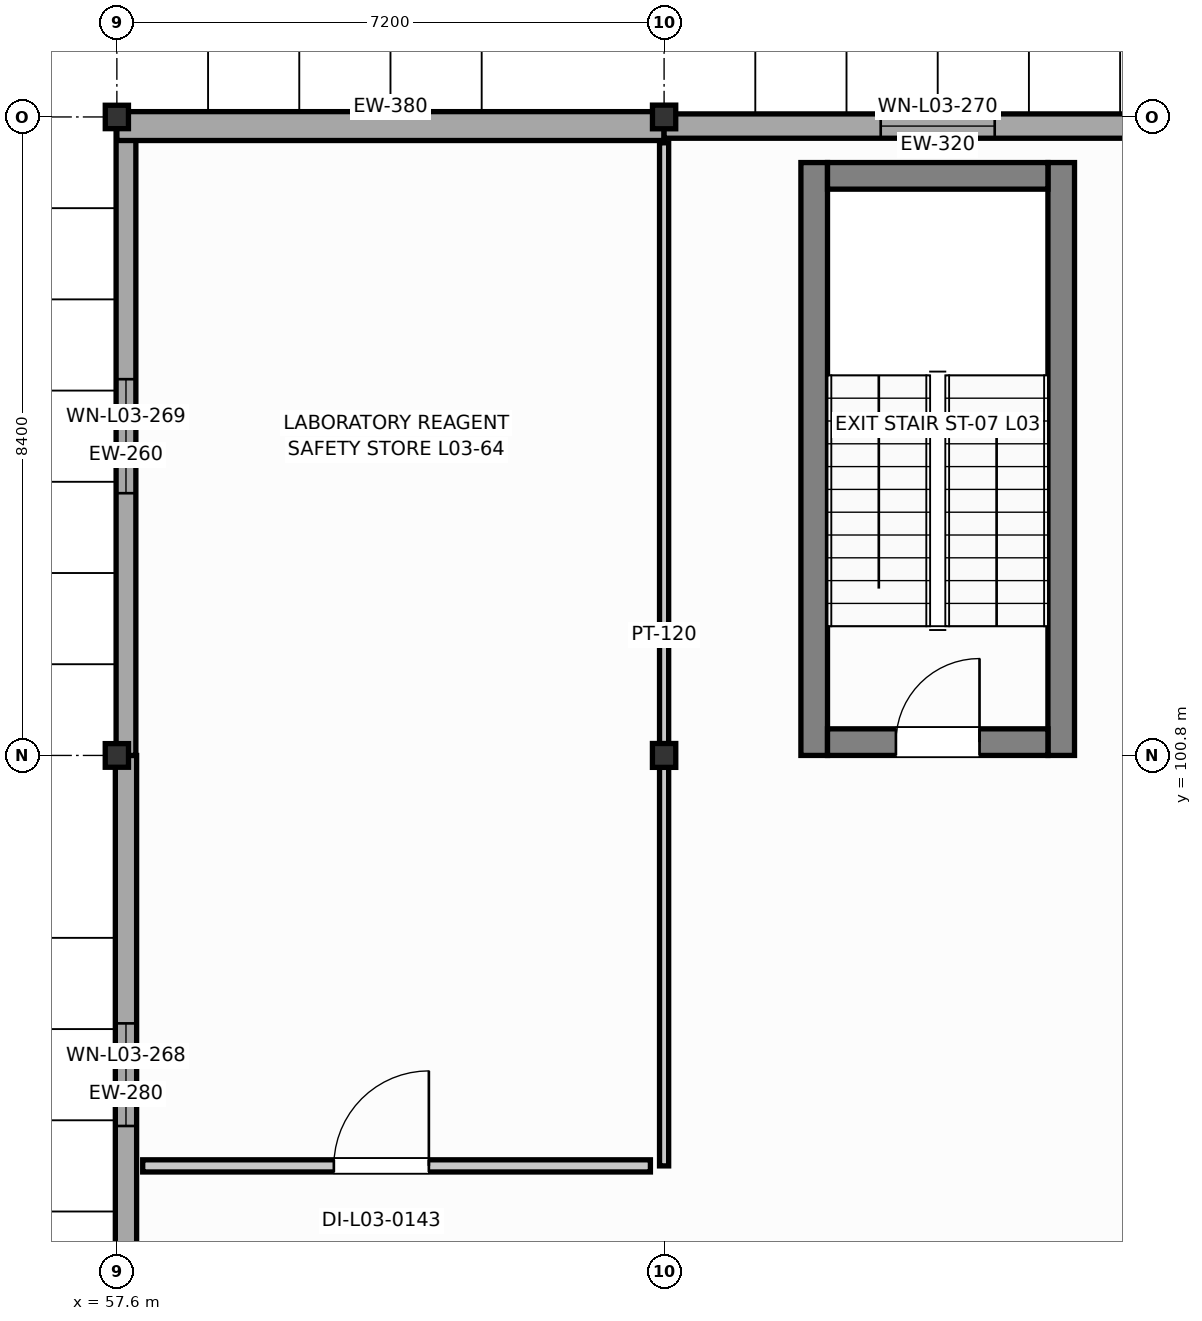
"""IFC4 building model, lengths in metres.
Left out: names, types, materials, properties, quantities, classifications, styles, units other than length and angle.
Written with IfcOpenShell. Run it as: python <this file> out.ifc"""

import sys

from ifc_helpers import new_model, si_unit, direction, frame, frame_2d, origin, origin_2d, place, context, subcontext, project, spatial, rectangle, i_section, extrude, element, fill, save


model = new_model("IFC4")
c1 = context("Model", 3, precision=1e-05, world=origin(), true_north=direction((0.0, 1.0)))
c2 = subcontext(c1, "Body", "Model", "MODEL_VIEW")
j1 = project(units=[si_unit("LENGTHUNIT", "METRE"), si_unit("PLANEANGLEUNIT", "RADIAN")], contexts=[c1])
p1 = place(None, origin())
s1 = spatial("IfcSite", under=j1, at=p1, CompositionType="ELEMENT")
p2 = place(p1, origin())
s2 = spatial("IfcBuilding", under=s1, at=p2, CompositionType="ELEMENT")
p3 = place(p2, frame((0.0, 0.0, 13.2)))
s3 = spatial("IfcBuildingStorey", under=s2, at=p3, CompositionType="ELEMENT", Elevation=13.2)
p4 = place(p3, frame((57.6, 100.8, 0.0), z_axis=(0.0, 0.0, 1.0), x_axis=(1.0, 0.0, 0.0)))
e1 = element("IfcColumn", 1, at=p4, inside=s3, PredefinedType="COLUMN", context=c2, shape_type="SweptSolid", body=[
    extrude(i_section(OverallWidth=0.306, OverallDepth=0.311, WebThickness=0.011, FlangeThickness=0.017, FilletRadius=0.015, at=origin_2d()), origin(), (0.0, 0.0, 1.0), 4.2),
])
p5 = place(p3, frame((57.6, 109.2, 0.0), z_axis=(0.0, 0.0, 1.0), x_axis=(1.0, 0.0, 0.0)))
e2 = element("IfcColumn", 2, at=p5, inside=s3, PredefinedType="COLUMN", context=c2, shape_type="SweptSolid", body=[
    extrude(i_section(OverallWidth=0.305, OverallDepth=0.308, WebThickness=0.01, FlangeThickness=0.015, FilletRadius=0.015, at=origin_2d()), origin(), (0.0, 0.0, 1.0), 4.2),
])
p6 = place(p3, frame((64.8, 100.8, 0.0), z_axis=(0.0, 0.0, 1.0), x_axis=(1.0, 0.0, 0.0)))
e3 = element("IfcColumn", 3, at=p6, inside=s3, PredefinedType="COLUMN", context=c2, shape_type="SweptSolid", body=[
    extrude(i_section(OverallWidth=0.307, OverallDepth=0.314, WebThickness=0.012, FlangeThickness=0.019, FilletRadius=0.016, at=origin_2d()), origin(), (0.0, 0.0, 1.0), 4.2),
])
p7 = place(p3, frame((64.8, 109.2, 0.0), z_axis=(0.0, 0.0, 1.0), x_axis=(1.0, 0.0, 0.0)))
e4 = element("IfcColumn", 4, at=p7, inside=s3, PredefinedType="COLUMN", context=c2, shape_type="SweptSolid", body=[
    extrude(i_section(OverallWidth=0.306, OverallDepth=0.311, WebThickness=0.011, FlangeThickness=0.017, FilletRadius=0.015, at=origin_2d()), origin(), (0.0, 0.0, 1.0), 4.2),
])
for number, where, z_axis, x_axis in (
    (5, (66.775, 100.8, 0.0), (0.0, 0.0, 1.0), (0.0, 1.0, 0.0)),
    (6, (70.025, 100.8, 0.0), (0.0, 0.0, 1.0), (0.0, 1.0, 0.0)),
):
    element("IfcWall", number, at=place(p3, frame(where, z_axis=z_axis, x_axis=x_axis)), inside=s3, PredefinedType="SHEAR", context=c2, shape_type="SweptSolid", body=[
        extrude(rectangle(XDim=7.8, YDim=0.35, at=frame_2d((3.9, 0.0))), origin(), (0.0, 0.0, 1.0), 3.97),
    ])
p8 = place(p3, frame((66.95, 108.425, 0.0), z_axis=(0.0, 0.0, 1.0), x_axis=(1.0, 0.0, 0.0)))
e7 = element("IfcWall", 7, at=p8, inside=s3, PredefinedType="SHEAR", context=c2, shape_type="SweptSolid", body=[
    extrude(rectangle(XDim=2.9, YDim=0.35, at=frame_2d((1.45, 0.0))), origin(), (0.0, 0.0, 1.0), 3.97),
])
p9 = place(p3, frame((66.95, 100.975, 0.0), z_axis=(0.0, 0.0, 1.0), x_axis=(1.0, 0.0, 0.0)))
e8 = element("IfcWall", 8, at=p9, inside=s3, PredefinedType="SHEAR", context=c2, shape_type="SweptSolid", body=[
    extrude(rectangle(XDim=2.9, YDim=0.35, at=frame_2d((1.45, 0.0))), origin(), (0.0, 0.0, 1.0), 3.97),
])
p10 = place(p9, frame((0.9, 0.0, 0.0)))
e9 = element("IfcOpeningElement", 9, at=p10, cuts=e8, PredefinedType="OPENING", context=c2, shape_type="SweptSolid", body=[
    extrude(rectangle(XDim=1.1, YDim=2.15, at=frame_2d((0.55, 1.075))), frame((0.0, 0.185, 0.0), z_axis=(0.0, -1.0, 0.0), x_axis=(1.0, 0.0, 0.0)), (0.0, 0.0, 1.0), 0.37),
])
p11 = place(p3, frame((57.72, 92.4, 0.0), z_axis=(0.0, 0.0, 1.0), x_axis=(0.0, 1.0, 0.0)))
e10 = element("IfcWall", 10, at=p11, inside=s3, PredefinedType="SOLIDWALL", context=c2, shape_type="SweptSolid", body=[
    extrude(rectangle(XDim=8.4, YDim=0.28, at=frame_2d((4.2, 0.0))), origin(), (0.0, 0.0, 1.0), 3.172),
])
p12 = place(p11, frame((3.525, 0.0, 0.95)))
e11 = element("IfcOpeningElement", 11, at=p12, cuts=e10, PredefinedType="OPENING", context=c2, shape_type="SweptSolid", body=[
    extrude(rectangle(XDim=1.35, YDim=1.75, at=frame_2d((0.675, 0.875))), frame((0.0, 0.15, 0.0), z_axis=(0.0, -1.0, 0.0), x_axis=(1.0, 0.0, 0.0)), (0.0, 0.0, 1.0), 0.3),
])
p13 = place(p3, frame((57.72, 100.8, 0.0), z_axis=(0.0, 0.0, 1.0), x_axis=(0.0, 1.0, 0.0)))
e12 = element("IfcWall", 12, at=p13, inside=s3, PredefinedType="SOLIDWALL", context=c2, shape_type="SweptSolid", body=[
    extrude(rectangle(XDim=8.4, YDim=0.26, at=frame_2d((4.2, 0.0))), origin(), (0.0, 0.0, 1.0), 3.172),
])
p14 = place(p13, frame((3.45, 0.0, 0.95)))
e13 = element("IfcOpeningElement", 13, at=p14, cuts=e12, PredefinedType="OPENING", context=c2, shape_type="SweptSolid", body=[
    extrude(rectangle(XDim=1.5, YDim=1.15, at=frame_2d((0.75, 0.575))), frame((0.0, 0.14, 0.0), z_axis=(0.0, -1.0, 0.0), x_axis=(1.0, 0.0, 0.0)), (0.0, 0.0, 1.0), 0.28),
])
p15 = place(p3, frame((57.6, 109.08, 0.0), z_axis=(0.0, 0.0, 1.0), x_axis=(1.0, 0.0, 0.0)))
e14 = element("IfcWall", 14, at=p15, inside=s3, PredefinedType="SOLIDWALL", context=c2, shape_type="SweptSolid", body=[
    extrude(rectangle(XDim=7.2, YDim=0.38, at=frame_2d((3.6, 0.0))), origin(), (0.0, 0.0, 1.0), 3.482),
])
p16 = place(p3, frame((64.8, 109.08, 0.0), z_axis=(0.0, 0.0, 1.0), x_axis=(1.0, 0.0, 0.0)))
e15 = element("IfcWall", 15, at=p16, inside=s3, PredefinedType="SOLIDWALL", context=c2, shape_type="SweptSolid", body=[
    extrude(rectangle(XDim=7.2, YDim=0.32, at=frame_2d((3.6, 0.0))), origin(), (0.0, 0.0, 1.0), 3.482),
])
p17 = place(p16, frame((2.85, 0.0, 0.95)))
e16 = element("IfcOpeningElement", 16, at=p17, cuts=e15, PredefinedType="OPENING", context=c2, shape_type="SweptSolid", body=[
    extrude(rectangle(XDim=1.5, YDim=1.35, at=frame_2d((0.75, 0.675))), frame((0.0, 0.17, 0.0), z_axis=(0.0, -1.0, 0.0), x_axis=(1.0, 0.0, 0.0)), (0.0, 0.0, 1.0), 0.34),
])
p18 = place(p3, frame((64.8, 108.86, 0.0), z_axis=(0.0, 0.0, 1.0), x_axis=(0.0, -1.0, 0.0)))
e17 = element("IfcWall", 17, at=p18, inside=s3, PredefinedType="PARTITIONING", context=c2, shape_type="SweptSolid", body=[
    extrude(rectangle(XDim=13.46, YDim=0.12, at=frame_2d((6.73, 0.0))), origin(), (0.0, 0.0, 1.0), 3.328),
])
p19 = place(p3, frame((64.62, 95.4, 0.0), z_axis=(0.0, 0.0, 1.0), x_axis=(-1.0, 0.0, 0.0)))
e18 = element("IfcWall", 18, at=p19, inside=s3, PredefinedType="PARTITIONING", context=c2, shape_type="SweptSolid", body=[
    extrude(rectangle(XDim=6.68, YDim=0.16, at=frame_2d((3.34, 0.0))), origin(), (0.0, 0.0, 1.0), 3.328),
])
p20 = place(p19, frame((2.915, 0.0, 0.0)))
e19 = element("IfcOpeningElement", 19, at=p20, cuts=e18, PredefinedType="OPENING", context=c2, shape_type="SweptSolid", body=[
    extrude(rectangle(XDim=1.25, YDim=2.15, at=frame_2d((0.625, 1.075))), frame((0.0, 0.09, 0.0), z_axis=(0.0, -1.0, 0.0), x_axis=(1.0, 0.0, 0.0)), (0.0, 0.0, 1.0), 0.18),
])
p21 = place(p10, origin())
e20 = element("IfcDoor", 20, at=p21, inside=s3, OperationType="SINGLE_SWING_RIGHT", PredefinedType="DOOR", context=c2, shape_type="SweptSolid", body=[
    extrude(rectangle(XDim=1.1, YDim=2.15, at=frame_2d((0.55, 1.075))), frame((0.0, 0.025, 0.0), z_axis=(0.0, -1.0, 0.0), x_axis=(1.0, 0.0, 0.0)), (0.0, 0.0, 1.0), 0.05),
])
fill(e9, e20)
p22 = place(p12, origin())
e21 = element("IfcWindow", 21, at=p22, inside=s3, PartitioningType="SINGLE_PANEL", PredefinedType="WINDOW", context=c2, shape_type="SweptSolid", body=[
    extrude(rectangle(XDim=1.35, YDim=1.75, at=frame_2d((0.675, 0.875))), frame((0.0, 0.03, 0.0), z_axis=(0.0, -1.0, 0.0), x_axis=(1.0, 0.0, 0.0)), (0.0, 0.0, 1.0), 0.06),
])
fill(e11, e21)
p23 = place(p14, origin())
e22 = element("IfcWindow", 22, at=p23, inside=s3, PartitioningType="SINGLE_PANEL", PredefinedType="WINDOW", context=c2, shape_type="SweptSolid", body=[
    extrude(rectangle(XDim=1.5, YDim=1.15, at=frame_2d((0.75, 0.575))), frame((0.0, 0.03, 0.0), z_axis=(0.0, -1.0, 0.0), x_axis=(1.0, 0.0, 0.0)), (0.0, 0.0, 1.0), 0.06),
])
fill(e13, e22)
p24 = place(p17, origin())
e23 = element("IfcWindow", 23, at=p24, inside=s3, PartitioningType="SINGLE_PANEL", PredefinedType="WINDOW", context=c2, shape_type="SweptSolid", body=[
    extrude(rectangle(XDim=1.5, YDim=1.35, at=frame_2d((0.75, 0.675))), frame((0.0, 0.03, 0.0), z_axis=(0.0, -1.0, 0.0), x_axis=(1.0, 0.0, 0.0)), (0.0, 0.0, 1.0), 0.06),
])
fill(e16, e23)
p25 = place(p20, frame((1.25, 0.0, 0.0), z_axis=(0.0, 0.0, 1.0), x_axis=(-1.0, 0.0, 0.0)))
e24 = element("IfcDoor", 24, at=p25, inside=s3, OperationType="SINGLE_SWING_RIGHT", PredefinedType="DOOR", context=c2, shape_type="SweptSolid", body=[
    extrude(rectangle(XDim=1.25, YDim=2.15, at=frame_2d((0.625, 1.075))), frame((0.0, 0.025, 0.0), z_axis=(0.0, -1.0, 0.0), x_axis=(1.0, 0.0, 0.0)), (0.0, 0.0, 1.0), 0.05),
])
fill(e19, e24)
save(model, sys.argv[1])
